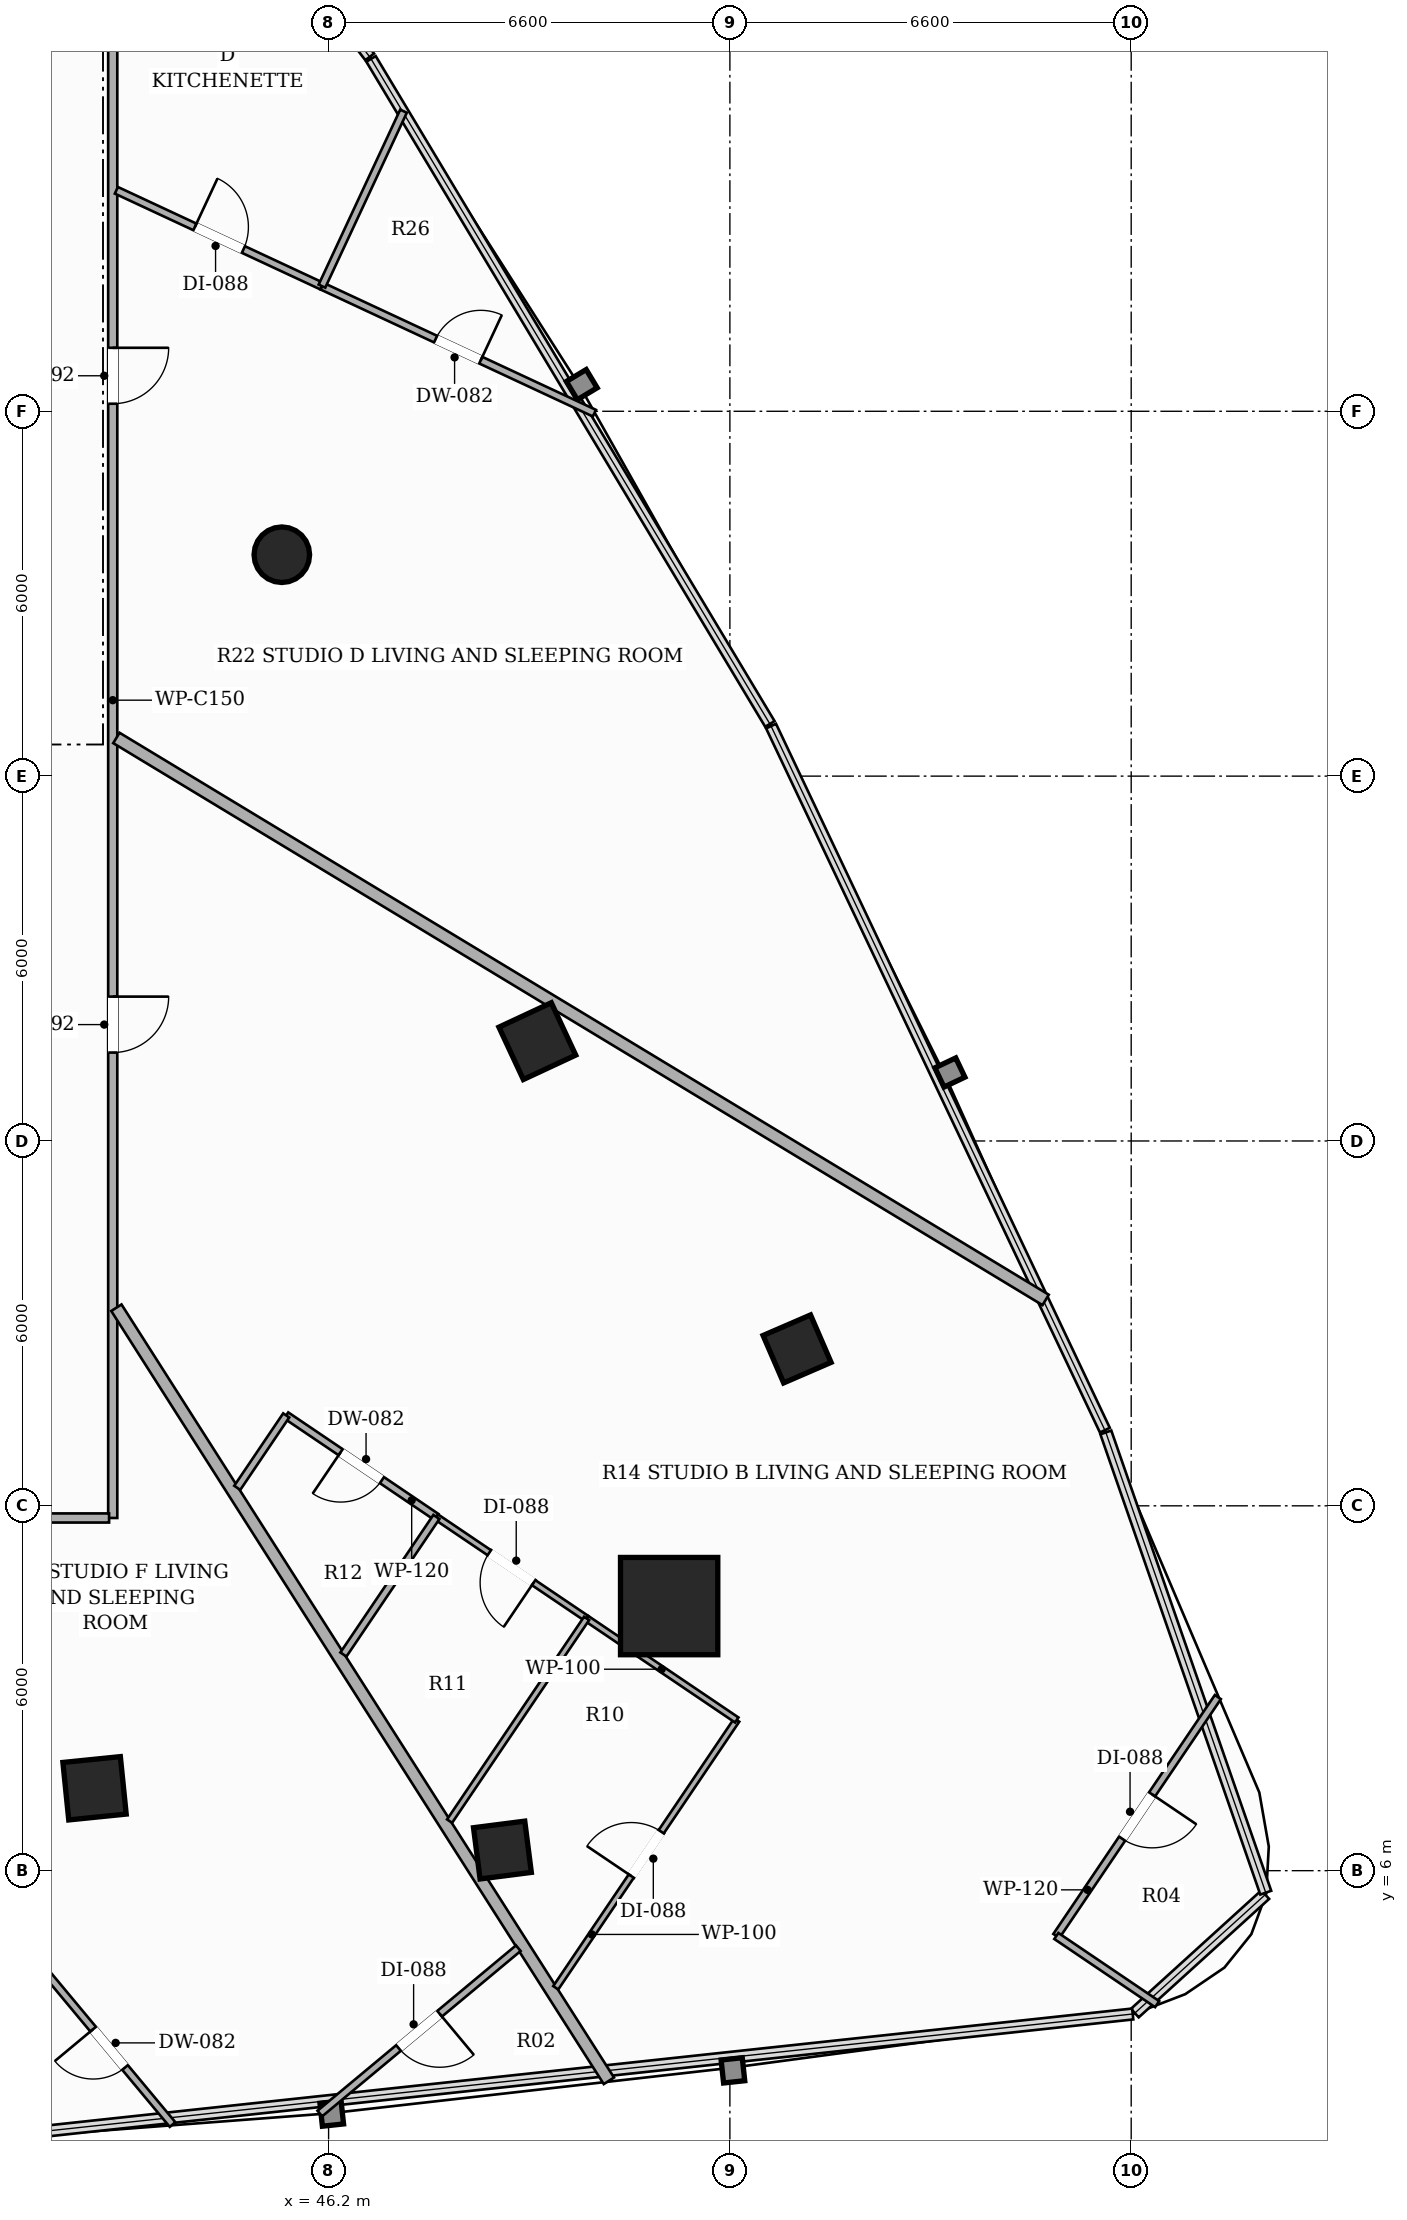
"""IFC4 building model, lengths in metres.
Left out: names, types, materials, properties, quantities, classifications, styles, units other than length and angle.
Written with IfcOpenShell. Run it as: python <this file> out.ifc"""

import sys

from ifc_helpers import new_model, si_unit, direction, frame, frame_2d, origin, origin_2d, place, context, subcontext, project, spatial, rectangle, hollow_rectangle, hollow_circle, extrude, element, fill, save


model = new_model("IFC4")
c1 = context("Model", 3, precision=1e-05, world=origin(), true_north=direction((0.0, 1.0)))
c2 = subcontext(c1, "Body", "Model", "MODEL_VIEW")
j1 = project(units=[si_unit("LENGTHUNIT", "METRE"), si_unit("PLANEANGLEUNIT", "RADIAN")], contexts=[c1])
p1 = place(None, origin())
s1 = spatial("IfcSite", under=j1, at=p1, CompositionType="ELEMENT")
p2 = place(p1, origin())
s2 = spatial("IfcBuilding", under=s1, at=p2, CompositionType="ELEMENT")
p3 = place(p2, frame((0.0, 0.0, 50.0)))
s3 = spatial("IfcBuildingStorey", under=s2, at=p3, CompositionType="ELEMENT", Elevation=50.0)
p4 = place(p3, frame((51.801, 10.351, 0.0), z_axis=(0.0, 0.0, 1.0), x_axis=(1.0, 0.0, 0.0)))
e1 = element("IfcColumn", 1, at=p4, inside=s3, PredefinedType="COLUMN", context=c2, shape_type="SweptSolid", body=[
    extrude(hollow_rectangle(XDim=1.6, YDim=1.6, WallThickness=0.05, at=origin_2d()), origin(), (0.0, 0.0, 1.0), 3.3),
])
for number, where, z_axis, x_axis in (
    (2, (42.351, 7.355, 0.0), (0.0, 0.0, 1.0), (0.995, 0.101, 0.0)),
    (3, (49.633, 19.642, 0.0), (0.0, 0.0, 1.0), (-0.423, 0.906, 0.0)),
):
    element("IfcColumn", number, at=place(p3, frame(where, z_axis=z_axis, x_axis=x_axis)), inside=s3, PredefinedType="COLUMN", context=c2, shape_type="SweptSolid", body=[
        extrude(hollow_rectangle(XDim=0.95, YDim=0.95, WallThickness=0.032, at=origin_2d()), origin(), (0.0, 0.0, 1.0), 3.3),
    ])
p5 = place(p3, frame((45.431, 27.641, 0.0), z_axis=(0.0, 0.0, 1.0), x_axis=(1.0, 0.0, 0.0)))
e4 = element("IfcColumn", 4, at=p5, inside=s3, PredefinedType="COLUMN", context=c2, shape_type="SweptSolid", body=[
    extrude(hollow_circle(Radius=0.457, WallThickness=0.025, at=origin_2d()), origin(), (0.0, 0.0, 1.0), 3.3),
])
for number, where, z_axis, x_axis in (
    (5, (49.059, 6.339, 0.0), (0.0, 0.0, 1.0), (0.992, 0.127, 0.0)),
    (6, (53.905, 14.58, 0.0), (0.0, 0.0, 1.0), (-0.397, 0.918, 0.0)),
):
    element("IfcColumn", number, at=place(p3, frame(where, z_axis=z_axis, x_axis=x_axis)), inside=s3, PredefinedType="COLUMN", context=c2, shape_type="SweptSolid", body=[
        extrude(hollow_rectangle(XDim=0.85, YDim=0.85, WallThickness=0.028, at=origin_2d()), origin(), (0.0, 0.0, 1.0), 3.3),
    ])
p6 = place(p3, frame((42.65, 36.84, 0.0), z_axis=(0.0, 0.0, 1.0), x_axis=(0.0, -1.0, 0.0)))
e7 = element("IfcWall", 7, at=p6, inside=s3, PredefinedType="PARTITIONING", context=c2, shape_type="SweptSolid", body=[
    extrude(rectangle(XDim=25.04, YDim=0.15, at=frame_2d((12.52, 0.0))), origin(), (0.0, 0.0, 1.0), 2.413),
])
p7 = place(p6, frame((16.466, 0.0, 0.0)))
e8 = element("IfcOpeningElement", 8, at=p7, cuts=e7, PredefinedType="OPENING", context=c2, shape_type="SweptSolid", body=[
    extrude(rectangle(XDim=0.92, YDim=2.15, at=frame_2d((0.46, 1.075))), frame((0.0, 0.085, 0.0), z_axis=(0.0, -1.0, 0.0), x_axis=(1.0, 0.0, 0.0)), (0.0, 0.0, 1.0), 0.17),
])
p8 = place(p6, frame((5.796, 0.0, 0.0)))
e9 = element("IfcOpeningElement", 9, at=p8, cuts=e7, PredefinedType="OPENING", context=c2, shape_type="SweptSolid", body=[
    extrude(rectangle(XDim=0.92, YDim=2.15, at=frame_2d((0.46, 1.075))), frame((0.0, 0.085, 0.0), z_axis=(0.0, -1.0, 0.0), x_axis=(1.0, 0.0, 0.0)), (0.0, 0.0, 1.0), 0.17),
])
p9 = place(p3, frame((42.59, 11.8, 0.0), z_axis=(0.0, 0.0, 1.0), x_axis=(-1.0, 0.0, 0.0)))
e10 = element("IfcWall", 10, at=p9, inside=s3, PredefinedType="PARTITIONING", context=c2, shape_type="SweptSolid", body=[
    extrude(rectangle(XDim=19.24, YDim=0.15, at=frame_2d((9.62, 0.0))), origin(), (0.0, 0.0, 1.0), 2.669),
])
p10 = place(p9, frame((10.508, 0.0, 0.0)))
e11 = element("IfcOpeningElement", 11, at=p10, cuts=e10, PredefinedType="OPENING", context=c2, shape_type="SweptSolid", body=[
    extrude(rectangle(XDim=0.88, YDim=2.1, at=frame_2d((0.44, 1.05))), frame((0.0, 0.085, 0.0), z_axis=(0.0, -1.0, 0.0), x_axis=(1.0, 0.0, 0.0)), (0.0, 0.0, 1.0), 0.17),
])
p11 = place(p9, frame((2.98, 0.0, 0.0)))
e12 = element("IfcOpeningElement", 12, at=p11, cuts=e10, PredefinedType="OPENING", context=c2, shape_type="SweptSolid", body=[
    extrude(rectangle(XDim=0.92, YDim=2.15, at=frame_2d((0.46, 1.075))), frame((0.0, 0.085, 0.0), z_axis=(0.0, -1.0, 0.0), x_axis=(1.0, 0.0, 0.0)), (0.0, 0.0, 1.0), 0.17),
])
p12 = place(p3, frame((42.71, 24.628, 0.0), z_axis=(0.0, 0.0, 1.0), x_axis=(0.85570509792, -0.517463801047, 0.0)))
e13 = element("IfcWall", 13, at=p12, inside=s3, PredefinedType="PARTITIONING", context=c2, shape_type="SweptSolid", body=[
    extrude(rectangle(XDim=17.86, YDim=0.2, at=frame_2d((8.93, 0.0))), origin(), (0.0, 0.0, 1.0), 2.413),
])
p13 = place(p3, frame((50.81, 2.544, 0.0), z_axis=(0.0, 0.0, 1.0), x_axis=(-0.537314491885, 0.843381963769, 0.0)))
e14 = element("IfcWall", 14, at=p13, inside=s3, PredefinedType="PARTITIONING", context=c2, shape_type="SweptSolid", body=[
    extrude(rectangle(XDim=15.075, YDim=0.2, at=frame_2d((7.538, 0.0))), origin(), (0.0, 0.0, 1.0), 2.413),
])
p14 = place(p3, frame((47.973, 11.817, 0.0), z_axis=(0.0, 0.0, 1.0), x_axis=(-0.82839181121, 0.560149093653, 0.0)))
e15 = element("IfcWall", 15, at=p14, inside=s3, PredefinedType="PARTITIONING", context=c2, shape_type="SweptSolid", body=[
    extrude(rectangle(XDim=2.982, YDim=0.12, at=frame_2d((1.491, 0.0))), origin(), (0.0, 0.0, 1.0), 2.669),
])
p15 = place(p14, frame((1.081, 0.0, 0.0)))
e16 = element("IfcOpeningElement", 16, at=p15, cuts=e15, PredefinedType="OPENING", context=c2, shape_type="SweptSolid", body=[
    extrude(rectangle(XDim=0.82, YDim=2.1, at=frame_2d((0.41, 1.05))), frame((0.0, 0.07, 0.0), z_axis=(0.0, -1.0, 0.0), x_axis=(1.0, 0.0, 0.0)), (0.0, 0.0, 1.0), 0.14),
])
p16 = place(p3, frame((45.503, 13.487, 0.0), z_axis=(0.0, 0.0, 1.0), x_axis=(-0.559901526605, -0.828559159328, 0.0)))
e17 = element("IfcWall", 17, at=p16, inside=s3, PredefinedType="PARTITIONING", context=c2, shape_type="SweptSolid", body=[
    extrude(rectangle(XDim=1.438, YDim=0.12, at=frame_2d((0.719, 0.0))), origin(), (0.0, 0.0, 1.0), 2.669),
])
p17 = place(p3, frame((60.825, 8.855, 0.0), z_axis=(0.0, 0.0, 1.0), x_axis=(-0.560046533867, -0.828461151716, 0.0)))
e18 = element("IfcWall", 18, at=p17, inside=s3, PredefinedType="PARTITIONING", context=c2, shape_type="SweptSolid", body=[
    extrude(rectangle(XDim=4.742, YDim=0.12, at=frame_2d((2.371, 0.0))), origin(), (0.0, 0.0, 1.0), 3.06),
])
p18 = place(p17, frame((1.931, 0.0, 0.0)))
e19 = element("IfcOpeningElement", 19, at=p18, cuts=e18, PredefinedType="OPENING", context=c2, shape_type="SweptSolid", body=[
    extrude(rectangle(XDim=0.88, YDim=2.1, at=frame_2d((0.44, 1.05))), frame((0.0, 0.07, 0.0), z_axis=(0.0, -1.0, 0.0), x_axis=(1.0, 0.0, 0.0)), (0.0, 0.0, 1.0), 0.14),
])
p19 = place(p3, frame((58.169, 4.926, 0.0), z_axis=(0.0, 0.0, 1.0), x_axis=(0.828391626579, -0.560149366699, 0.0)))
e20 = element("IfcWall", 20, at=p19, inside=s3, PredefinedType="PARTITIONING", context=c2, shape_type="SweptSolid", body=[
    extrude(rectangle(XDim=2.001, YDim=0.12, at=frame_2d((1.001, 0.0))), origin(), (0.0, 0.0, 1.0), 3.06),
])
p20 = place(p3, frame((49.936, 4.074, 0.0), z_axis=(0.0, 0.0, 1.0), x_axis=(0.560030395854, 0.828472060917, 0.0)))
e21 = element("IfcWall", 21, at=p20, inside=s3, PredefinedType="PARTITIONING", context=c2, shape_type="SweptSolid", body=[
    extrude(rectangle(XDim=5.316, YDim=0.1, at=frame_2d((2.658, 0.0))), origin(), (0.0, 0.0, 1.0), 3.06),
])
p21 = place(p20, frame((2.218, 0.0, 0.0)))
e22 = element("IfcOpeningElement", 22, at=p21, cuts=e21, PredefinedType="OPENING", context=c2, shape_type="SweptSolid", body=[
    extrude(rectangle(XDim=0.88, YDim=2.1, at=frame_2d((0.44, 1.05))), frame((0.0, 0.06, 0.0), z_axis=(0.0, -1.0, 0.0), x_axis=(1.0, 0.0, 0.0)), (0.0, 0.0, 1.0), 0.12),
])
p22 = place(p3, frame((52.913, 8.478, 0.0), z_axis=(0.0, 0.0, 1.0), x_axis=(-0.828429805787, 0.560092900226, 0.0)))
e23 = element("IfcWall", 23, at=p22, inside=s3, PredefinedType="PARTITIONING", context=c2, shape_type="SweptSolid", body=[
    extrude(rectangle(XDim=2.981, YDim=0.1, at=frame_2d((1.491, 0.0))), origin(), (0.0, 0.0, 1.0), 2.413),
])
p23 = place(p3, frame((50.443, 10.148, 0.0), z_axis=(0.0, 0.0, 1.0), x_axis=(-0.828607449923, 0.559830058082, 0.0)))
e24 = element("IfcWall", 24, at=p23, inside=s3, PredefinedType="PARTITIONING", context=c2, shape_type="SweptSolid", body=[
    extrude(rectangle(XDim=2.981, YDim=0.1, at=frame_2d((1.491, 0.0))), origin(), (0.0, 0.0, 1.0), 3.06),
])
p24 = place(p23, frame((1.051, 0.0, 0.0)))
e25 = element("IfcOpeningElement", 25, at=p24, cuts=e24, PredefinedType="OPENING", context=c2, shape_type="SweptSolid", body=[
    extrude(rectangle(XDim=0.88, YDim=2.1, at=frame_2d((0.44, 1.05))), frame((0.0, 0.06, 0.0), z_axis=(0.0, -1.0, 0.0), x_axis=(1.0, 0.0, 0.0)), (0.0, 0.0, 1.0), 0.12),
])
p25 = place(p3, frame((47.973, 11.817, 0.0), z_axis=(0.0, 0.0, 1.0), x_axis=(-0.559971898906, -0.828511600665, 0.0)))
e26 = element("IfcWall", 26, at=p25, inside=s3, PredefinedType="PARTITIONING", context=c2, shape_type="SweptSolid", body=[
    extrude(rectangle(XDim=2.73, YDim=0.12, at=frame_2d((1.365, 0.0))), origin(), (0.0, 0.0, 1.0), 2.669),
])
p26 = place(p3, frame((48.19, 6.815, 0.0), z_axis=(0.0, 0.0, 1.0), x_axis=(0.560052199206, 0.828457321873, 0.0)))
e27 = element("IfcWall", 27, at=p26, inside=s3, PredefinedType="PARTITIONING", context=c2, shape_type="SweptSolid", body=[
    extrude(rectangle(XDim=4.023, YDim=0.1, at=frame_2d((2.012, 0.0))), origin(), (0.0, 0.0, 1.0), 2.413),
])
p27 = place(p3, frame((46.091, 32.058, 0.0), z_axis=(0.0, 0.0, 1.0), x_axis=(0.906338250566, -0.422552926343, 0.0)))
e28 = element("IfcWall", 28, at=p27, inside=s3, PredefinedType="PARTITIONING", context=c2, shape_type="SweptSolid", body=[
    extrude(rectangle(XDim=4.944, YDim=0.12, at=frame_2d((2.472, 0.0))), origin(), (0.0, 0.0, 1.0), 3.06),
])
p28 = place(p27, frame((2.062, 0.0, 0.0)))
e29 = element("IfcOpeningElement", 29, at=p28, cuts=e28, PredefinedType="OPENING", context=c2, shape_type="SweptSolid", body=[
    extrude(rectangle(XDim=0.82, YDim=2.1, at=frame_2d((0.41, 1.05))), frame((0.0, 0.07, 0.0), z_axis=(0.0, -1.0, 0.0), x_axis=(1.0, 0.0, 0.0)), (0.0, 0.0, 1.0), 0.14),
])
p29 = place(p3, frame((42.71, 33.634, 0.0), z_axis=(0.0, 0.0, 1.0), x_axis=(0.906380338854, -0.422462638985, 0.0)))
e30 = element("IfcWall", 30, at=p29, inside=s3, PredefinedType="PARTITIONING", context=c2, shape_type="SweptSolid", body=[
    extrude(rectangle(XDim=3.73, YDim=0.12, at=frame_2d((1.865, 0.0))), origin(), (0.0, 0.0, 1.0), 3.06),
])
p30 = place(p29, frame((1.425, 0.0, 0.0)))
e31 = element("IfcOpeningElement", 31, at=p30, cuts=e30, PredefinedType="OPENING", context=c2, shape_type="SweptSolid", body=[
    extrude(rectangle(XDim=0.88, YDim=2.1, at=frame_2d((0.44, 1.05))), frame((0.0, 0.07, 0.0), z_axis=(0.0, -1.0, 0.0), x_axis=(1.0, 0.0, 0.0)), (0.0, 0.0, 1.0), 0.14),
])
p31 = place(p3, frame((46.091, 32.058, 0.0), z_axis=(0.0, 0.0, 1.0), x_axis=(0.422430644664, 0.906395250677, 0.0)))
e32 = element("IfcWall", 32, at=p31, inside=s3, PredefinedType="PARTITIONING", context=c2, shape_type="SweptSolid", body=[
    extrude(rectangle(XDim=3.174, YDim=0.12, at=frame_2d((1.587, 0.0))), origin(), (0.0, 0.0, 1.0), 3.06),
])
p32 = place(p3, frame((43.634, 1.825, 0.0), z_axis=(0.0, 0.0, 1.0), x_axis=(-0.639911914418, 0.768448268777, 0.0)))
e33 = element("IfcWall", 33, at=p32, inside=s3, PredefinedType="PARTITIONING", context=c2, shape_type="SweptSolid", body=[
    extrude(rectangle(XDim=3.261, YDim=0.12, at=frame_2d((1.631, 0.0))), origin(), (0.0, 0.0, 1.0), 3.06),
])
p33 = place(p32, frame((1.221, 0.0, 0.0)))
e34 = element("IfcOpeningElement", 34, at=p33, cuts=e33, PredefinedType="OPENING", context=c2, shape_type="SweptSolid", body=[
    extrude(rectangle(XDim=0.82, YDim=2.1, at=frame_2d((0.41, 1.05))), frame((0.0, 0.07, 0.0), z_axis=(0.0, -1.0, 0.0), x_axis=(1.0, 0.0, 0.0)), (0.0, 0.0, 1.0), 0.14),
])
p34 = place(p3, frame((49.32, 4.725, 0.0), z_axis=(0.0, 0.0, 1.0), x_axis=(-0.768353158093, -0.640026112317, 0.0)))
e35 = element("IfcWall", 35, at=p34, inside=s3, PredefinedType="PARTITIONING", context=c2, shape_type="SweptSolid", body=[
    extrude(rectangle(XDim=4.248, YDim=0.12, at=frame_2d((2.124, 0.0))), origin(), (0.0, 0.0, 1.0), 3.06),
])
p35 = place(p34, frame((1.684, 0.0, 0.0)))
e36 = element("IfcOpeningElement", 36, at=p35, cuts=e35, PredefinedType="OPENING", context=c2, shape_type="SweptSolid", body=[
    extrude(rectangle(XDim=0.88, YDim=2.1, at=frame_2d((0.44, 1.05))), frame((0.0, 0.07, 0.0), z_axis=(0.0, -1.0, 0.0), x_axis=(1.0, 0.0, 0.0)), (0.0, 0.0, 1.0), 0.14),
])
p36 = place(p7, origin())
e37 = element("IfcDoor", 37, at=p36, inside=s3, OperationType="SINGLE_SWING_LEFT", PredefinedType="DOOR", context=c2, shape_type="SweptSolid", body=[
    extrude(rectangle(XDim=0.92, YDim=2.15, at=frame_2d((0.46, 1.075))), frame((0.0, 0.025, 0.0), z_axis=(0.0, -1.0, 0.0), x_axis=(1.0, 0.0, 0.0)), (0.0, 0.0, 1.0), 0.05),
])
fill(e8, e37)
p37 = place(p15, origin())
e38 = element("IfcDoor", 38, at=p37, inside=s3, OperationType="SINGLE_SWING_RIGHT", PredefinedType="DOOR", context=c2, shape_type="SweptSolid", body=[
    extrude(rectangle(XDim=0.82, YDim=2.1, at=frame_2d((0.41, 1.05))), frame((0.0, 0.025, 0.0), z_axis=(0.0, -1.0, 0.0), x_axis=(1.0, 0.0, 0.0)), (0.0, 0.0, 1.0), 0.05),
])
fill(e16, e38)
p38 = place(p18, origin())
e39 = element("IfcDoor", 39, at=p38, inside=s3, OperationType="SINGLE_SWING_LEFT", PredefinedType="DOOR", context=c2, shape_type="SweptSolid", body=[
    extrude(rectangle(XDim=0.88, YDim=2.1, at=frame_2d((0.44, 1.05))), frame((0.0, 0.025, 0.0), z_axis=(0.0, -1.0, 0.0), x_axis=(1.0, 0.0, 0.0)), (0.0, 0.0, 1.0), 0.05),
])
fill(e19, e39)
p39 = place(p21, origin())
e40 = element("IfcDoor", 40, at=p39, inside=s3, OperationType="SINGLE_SWING_LEFT", PredefinedType="DOOR", context=c2, shape_type="SweptSolid", body=[
    extrude(rectangle(XDim=0.88, YDim=2.1, at=frame_2d((0.44, 1.05))), frame((0.0, 0.025, 0.0), z_axis=(0.0, -1.0, 0.0), x_axis=(1.0, 0.0, 0.0)), (0.0, 0.0, 1.0), 0.05),
])
fill(e22, e40)
p40 = place(p24, origin())
e41 = element("IfcDoor", 41, at=p40, inside=s3, OperationType="SINGLE_SWING_LEFT", PredefinedType="DOOR", context=c2, shape_type="SweptSolid", body=[
    extrude(rectangle(XDim=0.88, YDim=2.1, at=frame_2d((0.44, 1.05))), frame((0.0, 0.025, 0.0), z_axis=(0.0, -1.0, 0.0), x_axis=(1.0, 0.0, 0.0)), (0.0, 0.0, 1.0), 0.05),
])
fill(e25, e41)
p41 = place(p8, origin())
e42 = element("IfcDoor", 42, at=p41, inside=s3, OperationType="SINGLE_SWING_LEFT", PredefinedType="DOOR", context=c2, shape_type="SweptSolid", body=[
    extrude(rectangle(XDim=0.92, YDim=2.15, at=frame_2d((0.46, 1.075))), frame((0.0, 0.025, 0.0), z_axis=(0.0, -1.0, 0.0), x_axis=(1.0, 0.0, 0.0)), (0.0, 0.0, 1.0), 0.05),
])
fill(e9, e42)
p42 = place(p28, origin())
e43 = element("IfcDoor", 43, at=p42, inside=s3, OperationType="SINGLE_SWING_RIGHT", PredefinedType="DOOR", context=c2, shape_type="SweptSolid", body=[
    extrude(rectangle(XDim=0.82, YDim=2.1, at=frame_2d((0.41, 1.05))), frame((0.0, 0.025, 0.0), z_axis=(0.0, -1.0, 0.0), x_axis=(1.0, 0.0, 0.0)), (0.0, 0.0, 1.0), 0.05),
])
fill(e29, e43)
p43 = place(p30, origin())
e44 = element("IfcDoor", 44, at=p43, inside=s3, OperationType="SINGLE_SWING_LEFT", PredefinedType="DOOR", context=c2, shape_type="SweptSolid", body=[
    extrude(rectangle(XDim=0.88, YDim=2.1, at=frame_2d((0.44, 1.05))), frame((0.0, 0.025, 0.0), z_axis=(0.0, -1.0, 0.0), x_axis=(1.0, 0.0, 0.0)), (0.0, 0.0, 1.0), 0.05),
])
fill(e31, e44)
p44 = place(p33, origin())
e45 = element("IfcDoor", 45, at=p44, inside=s3, OperationType="SINGLE_SWING_RIGHT", PredefinedType="DOOR", context=c2, shape_type="SweptSolid", body=[
    extrude(rectangle(XDim=0.82, YDim=2.1, at=frame_2d((0.41, 1.05))), frame((0.0, 0.025, 0.0), z_axis=(0.0, -1.0, 0.0), x_axis=(1.0, 0.0, 0.0)), (0.0, 0.0, 1.0), 0.05),
])
fill(e34, e45)
p45 = place(p35, origin())
e46 = element("IfcDoor", 46, at=p45, inside=s3, OperationType="SINGLE_SWING_LEFT", PredefinedType="DOOR", context=c2, shape_type="SweptSolid", body=[
    extrude(rectangle(XDim=0.88, YDim=2.1, at=frame_2d((0.44, 1.05))), frame((0.0, 0.025, 0.0), z_axis=(0.0, -1.0, 0.0), x_axis=(1.0, 0.0, 0.0)), (0.0, 0.0, 1.0), 0.05),
])
fill(e36, e46)
save(model, sys.argv[1])
